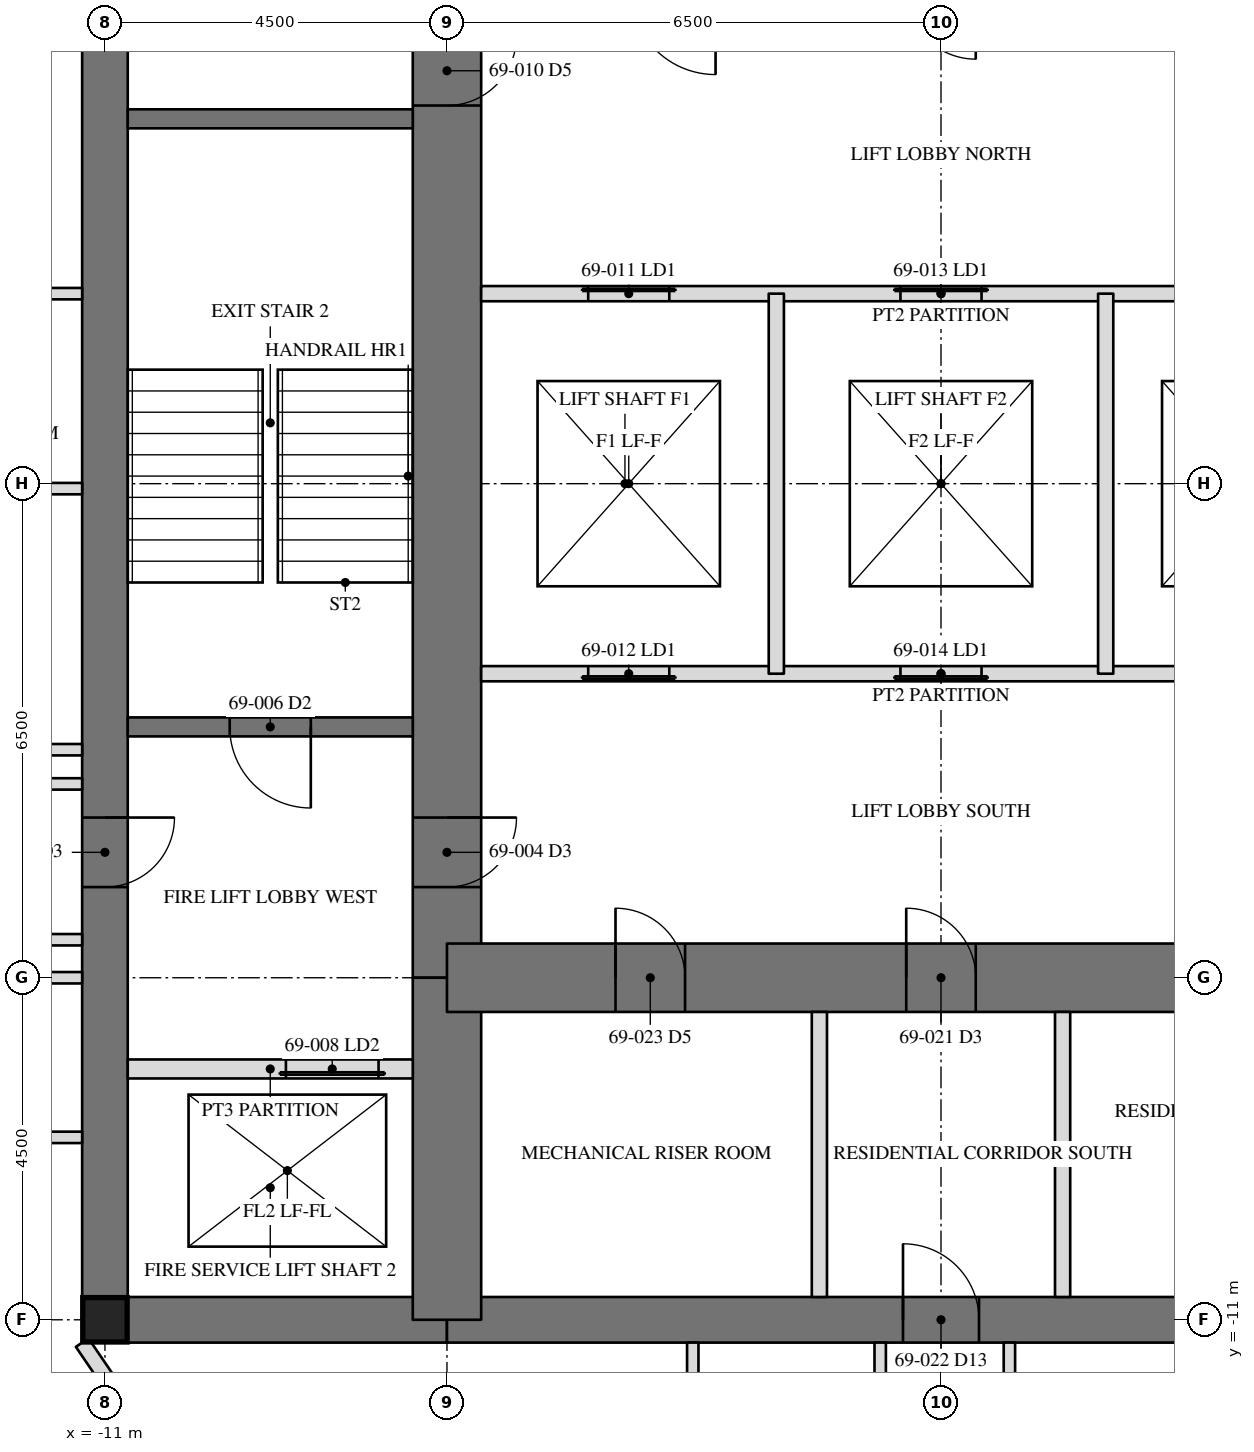
"""IFC4 building model, lengths in metres.
Left out: names, types, materials, properties, quantities, classifications, styles, units other than length and angle.
Written with IfcOpenShell. Run it as: python <this file> out.ifc"""

import sys

from ifc_helpers import new_model, si_unit, direction, frame, frame_2d, origin, origin_2d, place, context, subcontext, project, spatial, rectangle, hollow_rectangle, extrude, element, fill, save


model = new_model("IFC4")
c1 = context("Model", 3, precision=1e-05, world=origin(), true_north=direction((0.0, 1.0)))
c2 = subcontext(c1, "Body", "Model", "MODEL_VIEW")
j1 = project(units=[si_unit("LENGTHUNIT", "METRE"), si_unit("PLANEANGLEUNIT", "RADIAN")], contexts=[c1])
p1 = place(None, origin())
s1 = spatial("IfcSite", under=j1, at=p1, CompositionType="ELEMENT")
p2 = place(p1, origin())
s2 = spatial("IfcBuilding", under=s1, at=p2, CompositionType="ELEMENT")
p3 = place(p2, frame((0.0, 0.0, 281.2)))
s3 = spatial("IfcBuildingStorey", under=s2, at=p3, CompositionType="ELEMENT", Elevation=281.2)
p4 = place(p3, frame((-11.0, 11.0, 0.0), z_axis=(0.0, 0.0, 1.0), x_axis=(0.0, -1.0, 0.0)))
e1 = element("IfcWall", 1, at=p4, inside=s3, PredefinedType="SHEAR", context=c2, shape_type="SweptSolid", body=[
    extrude(rectangle(XDim=22.0, YDim=0.6, at=frame_2d((11.0, 0.0))), origin(), (0.0, 0.0, 1.0), 3.6),
])
p5 = place(p4, frame((15.393, 0.0, 0.0)))
e2 = element("IfcOpeningElement", 2, at=p5, cuts=e1, PredefinedType="OPENING", context=c2, shape_type="SweptSolid", body=[
    extrude(rectangle(XDim=0.915, YDim=2.134, at=frame_2d((0.458, 1.067))), frame((0.0, 0.31, 0.0), z_axis=(0.0, -1.0, 0.0), x_axis=(1.0, 0.0, 0.0)), (0.0, 0.0, 1.0), 0.62),
])
p6 = place(p3, frame((-11.0, -11.0, 0.0), z_axis=(0.0, 0.0, 1.0), x_axis=(1.0, 0.0, 0.0)))
e3 = element("IfcWall", 3, at=p6, inside=s3, PredefinedType="SHEAR", context=c2, shape_type="SweptSolid", body=[
    extrude(rectangle(XDim=4.5, YDim=0.6, at=frame_2d((2.25, 0.0))), origin(), (0.0, 0.0, 1.0), 3.6),
])
p7 = place(p3, frame((-6.5, -11.0, 0.0), z_axis=(0.0, 0.0, 1.0), x_axis=(1.0, 0.0, 0.0)))
e4 = element("IfcWall", 4, at=p7, inside=s3, PredefinedType="SHEAR", context=c2, shape_type="SweptSolid", body=[
    extrude(rectangle(XDim=13.0, YDim=0.6, at=frame_2d((6.5, 0.0))), origin(), (0.0, 0.0, 1.0), 3.6),
])
p8 = place(p7, frame((6.0, 0.0, 0.0)))
e5 = element("IfcOpeningElement", 5, at=p8, cuts=e4, PredefinedType="OPENING", context=c2, shape_type="SweptSolid", body=[
    extrude(rectangle(XDim=1.0, YDim=2.134, at=frame_2d((0.5, 1.067))), frame((0.0, 0.31, 0.0), z_axis=(0.0, -1.0, 0.0), x_axis=(1.0, 0.0, 0.0)), (0.0, 0.0, 1.0), 0.62),
])
p9 = place(p3, frame((-6.5, 6.5, 0.0), z_axis=(0.0, 0.0, 1.0), x_axis=(0.0, -1.0, 0.0)))
e6 = element("IfcWall", 6, at=p9, inside=s3, PredefinedType="SHEAR", context=c2, shape_type="SweptSolid", body=[
    extrude(rectangle(XDim=13.0, YDim=0.9, at=frame_2d((6.5, 0.0))), origin(), (0.0, 0.0, 1.0), 3.6),
])
p10 = place(p9, frame((10.893, 0.0, 0.0)))
e7 = element("IfcOpeningElement", 7, at=p10, cuts=e6, PredefinedType="OPENING", context=c2, shape_type="SweptSolid", body=[
    extrude(rectangle(XDim=0.915, YDim=2.134, at=frame_2d((0.458, 1.067))), frame((0.0, 0.46, 0.0), z_axis=(0.0, -1.0, 0.0), x_axis=(1.0, 0.0, 0.0)), (0.0, 0.0, 1.0), 0.92),
])
p11 = place(p9, frame((0.61, 0.0, 0.0)))
e8 = element("IfcOpeningElement", 8, at=p11, cuts=e6, PredefinedType="OPENING", context=c2, shape_type="SweptSolid", body=[
    extrude(rectangle(XDim=0.915, YDim=2.134, at=frame_2d((0.458, 1.067))), frame((0.0, 0.46, 0.0), z_axis=(0.0, -1.0, 0.0), x_axis=(1.0, 0.0, 0.0)), (0.0, 0.0, 1.0), 0.92),
])
p12 = place(p3, frame((-6.5, -6.5, 0.0), z_axis=(0.0, 0.0, 1.0), x_axis=(0.0, -1.0, 0.0)))
e9 = element("IfcWall", 9, at=p12, inside=s3, PredefinedType="SHEAR", context=c2, shape_type="SweptSolid", body=[
    extrude(rectangle(XDim=4.5, YDim=0.9, at=frame_2d((2.25, 0.0))), origin(), (0.0, 0.0, 1.0), 3.6),
])
p13 = place(p3, frame((-6.5, -6.5, 0.0), z_axis=(0.0, 0.0, 1.0), x_axis=(1.0, 0.0, 0.0)))
e10 = element("IfcWall", 10, at=p13, inside=s3, PredefinedType="SHEAR", context=c2, shape_type="SweptSolid", body=[
    extrude(rectangle(XDim=13.0, YDim=0.9, at=frame_2d((6.5, 0.0))), origin(), (0.0, 0.0, 1.0), 3.6),
])
p14 = place(p13, frame((6.042, 0.0, 0.0)))
e11 = element("IfcOpeningElement", 11, at=p14, cuts=e10, PredefinedType="OPENING", context=c2, shape_type="SweptSolid", body=[
    extrude(rectangle(XDim=0.915, YDim=2.134, at=frame_2d((0.458, 1.067))), frame((0.0, 0.46, 0.0), z_axis=(0.0, -1.0, 0.0), x_axis=(1.0, 0.0, 0.0)), (0.0, 0.0, 1.0), 0.92),
])
p15 = place(p13, frame((2.218, 0.0, 0.0)))
e12 = element("IfcOpeningElement", 12, at=p15, cuts=e10, PredefinedType="OPENING", context=c2, shape_type="SweptSolid", body=[
    extrude(rectangle(XDim=0.915, YDim=2.134, at=frame_2d((0.458, 1.067))), frame((0.0, 0.46, 0.0), z_axis=(0.0, -1.0, 0.0), x_axis=(1.0, 0.0, 0.0)), (0.0, 0.0, 1.0), 0.92),
])
p16 = place(p13, frame((9.867, 0.0, 0.0)))
e13 = element("IfcOpeningElement", 13, at=p16, cuts=e10, PredefinedType="OPENING", context=c2, shape_type="SweptSolid", body=[
    extrude(rectangle(XDim=0.915, YDim=2.134, at=frame_2d((0.458, 1.067))), frame((0.0, 0.46, 0.0), z_axis=(0.0, -1.0, 0.0), x_axis=(1.0, 0.0, 0.0)), (0.0, 0.0, 1.0), 0.92),
])
p17 = place(p3, frame((-11.0, -11.0, 0.0), z_axis=(0.0, 0.0, 1.0), x_axis=(1.0, 0.0, 0.0)))
e14 = element("IfcColumn", 14, at=p17, inside=s3, PredefinedType="COLUMN", context=c2, shape_type="SweptSolid", body=[
    extrude(hollow_rectangle(XDim=0.584, YDim=0.584, WallThickness=0.051, at=origin_2d()), origin(), (0.0, 0.0, 1.0), 3.6),
])
p18 = place(p3, frame((-6.95, 4.8, 0.0), z_axis=(0.0, 0.0, 1.0), x_axis=(-1.0, 0.0, 0.0)))
e15 = element("IfcWall", 15, at=p18, inside=s3, PredefinedType="SOLIDWALL", context=c2, shape_type="SweptSolid", body=[
    extrude(rectangle(XDim=3.75, YDim=0.25, at=frame_2d((1.875, 0.0))), origin(), (0.0, 0.0, 1.0), 3.41),
])
p19 = place(p3, frame((-6.95, -3.2, 0.0), z_axis=(0.0, 0.0, 1.0), x_axis=(-1.0, 0.0, 0.0)))
e16 = element("IfcWall", 16, at=p19, inside=s3, PredefinedType="SOLIDWALL", context=c2, shape_type="SweptSolid", body=[
    extrude(rectangle(XDim=3.75, YDim=0.25, at=frame_2d((1.875, 0.0))), origin(), (0.0, 0.0, 1.0), 3.41),
])
p20 = place(p19, frame((1.342, 0.0, 0.0)))
e17 = element("IfcOpeningElement", 17, at=p20, cuts=e16, PredefinedType="OPENING", context=c2, shape_type="SweptSolid", body=[
    extrude(rectangle(XDim=1.067, YDim=2.134, at=frame_2d((0.533, 1.067))), frame((0.0, 0.135, 0.0), z_axis=(0.0, -1.0, 0.0), x_axis=(1.0, 0.0, 0.0)), (0.0, 0.0, 1.0), 0.27),
])
p21 = place(p3, frame((-6.95, -7.7, 0.0), z_axis=(0.0, 0.0, 1.0), x_axis=(-1.0, 0.0, 0.0)))
e18 = element("IfcWall", 18, at=p21, inside=s3, PredefinedType="PARTITIONING", context=c2, shape_type="SweptSolid", body=[
    extrude(rectangle(XDim=3.75, YDim=0.25, at=frame_2d((1.875, 0.0))), origin(), (0.0, 0.0, 1.0), 3.41),
])
p22 = place(p21, frame((0.45, 0.0, 0.0)))
e19 = element("IfcOpeningElement", 19, at=p22, cuts=e18, PredefinedType="OPENING", context=c2, shape_type="SweptSolid", body=[
    extrude(rectangle(XDim=1.219, YDim=2.134, at=frame_2d((0.609, 1.067))), frame((0.0, 0.135, 0.0), z_axis=(0.0, -1.0, 0.0), x_axis=(1.0, 0.0, 0.0)), (0.0, 0.0, 1.0), 0.27),
])
p23 = place(p3, frame((-6.05, 2.5, 0.0), z_axis=(0.0, 0.0, 1.0), x_axis=(1.0, 0.0, 0.0)))
e20 = element("IfcWall", 20, at=p23, inside=s3, PredefinedType="PARTITIONING", context=c2, shape_type="SweptSolid", body=[
    extrude(rectangle(XDim=12.1, YDim=0.2, at=frame_2d((6.05, 0.0))), origin(), (0.0, 0.0, 1.0), 3.41),
])
p24 = place(p23, frame((1.408, 0.0, 0.0)))
e21 = element("IfcOpeningElement", 21, at=p24, cuts=e20, PredefinedType="OPENING", context=c2, shape_type="SweptSolid", body=[
    extrude(rectangle(XDim=1.067, YDim=2.134, at=frame_2d((0.533, 1.067))), frame((0.0, 0.11, 0.0), z_axis=(0.0, -1.0, 0.0), x_axis=(1.0, 0.0, 0.0)), (0.0, 0.0, 1.0), 0.22),
])
p25 = place(p23, frame((5.517, 0.0, 0.0)))
e22 = element("IfcOpeningElement", 22, at=p25, cuts=e20, PredefinedType="OPENING", context=c2, shape_type="SweptSolid", body=[
    extrude(rectangle(XDim=1.067, YDim=2.134, at=frame_2d((0.533, 1.067))), frame((0.0, 0.11, 0.0), z_axis=(0.0, -1.0, 0.0), x_axis=(1.0, 0.0, 0.0)), (0.0, 0.0, 1.0), 0.22),
])
p26 = place(p23, frame((9.625, 0.0, 0.0)))
e23 = element("IfcOpeningElement", 23, at=p26, cuts=e20, PredefinedType="OPENING", context=c2, shape_type="SweptSolid", body=[
    extrude(rectangle(XDim=1.067, YDim=2.134, at=frame_2d((0.533, 1.067))), frame((0.0, 0.11, 0.0), z_axis=(0.0, -1.0, 0.0), x_axis=(1.0, 0.0, 0.0)), (0.0, 0.0, 1.0), 0.22),
])
p27 = place(p3, frame((6.05, -2.5, 0.0), z_axis=(0.0, 0.0, 1.0), x_axis=(-1.0, 0.0, 0.0)))
e24 = element("IfcWall", 24, at=p27, inside=s3, PredefinedType="PARTITIONING", context=c2, shape_type="SweptSolid", body=[
    extrude(rectangle(XDim=12.1, YDim=0.2, at=frame_2d((6.05, 0.0))), origin(), (0.0, 0.0, 1.0), 3.41),
])
p28 = place(p27, frame((9.625, 0.0, 0.0)))
e25 = element("IfcOpeningElement", 25, at=p28, cuts=e24, PredefinedType="OPENING", context=c2, shape_type="SweptSolid", body=[
    extrude(rectangle(XDim=1.067, YDim=2.134, at=frame_2d((0.533, 1.067))), frame((0.0, 0.11, 0.0), z_axis=(0.0, -1.0, 0.0), x_axis=(1.0, 0.0, 0.0)), (0.0, 0.0, 1.0), 0.22),
])
p29 = place(p27, frame((5.517, 0.0, 0.0)))
e26 = element("IfcOpeningElement", 26, at=p29, cuts=e24, PredefinedType="OPENING", context=c2, shape_type="SweptSolid", body=[
    extrude(rectangle(XDim=1.067, YDim=2.134, at=frame_2d((0.533, 1.067))), frame((0.0, 0.11, 0.0), z_axis=(0.0, -1.0, 0.0), x_axis=(1.0, 0.0, 0.0)), (0.0, 0.0, 1.0), 0.22),
])
p30 = place(p27, frame((1.408, 0.0, 0.0)))
e27 = element("IfcOpeningElement", 27, at=p30, cuts=e24, PredefinedType="OPENING", context=c2, shape_type="SweptSolid", body=[
    extrude(rectangle(XDim=1.067, YDim=2.134, at=frame_2d((0.533, 1.067))), frame((0.0, 0.11, 0.0), z_axis=(0.0, -1.0, 0.0), x_axis=(1.0, 0.0, 0.0)), (0.0, 0.0, 1.0), 0.22),
])
for number, where, z_axis, x_axis in (
    (28, (-2.167, -2.5, 0.0), (0.0, 0.0, 1.0), (0.0, 1.0, 0.0)),
    (29, (2.167, -2.5, 0.0), (0.0, 0.0, 1.0), (0.0, 1.0, 0.0)),
):
    element("IfcWall", number, at=place(p3, frame(where, z_axis=z_axis, x_axis=x_axis)), inside=s3, PredefinedType="PARTITIONING", context=c2, shape_type="SweptSolid", body=[
        extrude(rectangle(XDim=5.0, YDim=0.2, at=frame_2d((2.5, 0.0))), origin(), (0.0, 0.0, 1.0), 3.41),
    ])
for number, where, z_axis, x_axis in (
    (30, (-1.6, -6.95, 0.0), (0.0, 0.0, 1.0), (0.0, -1.0, 0.0)),
    (31, (1.6, -6.95, 0.0), (0.0, 0.0, 1.0), (0.0, -1.0, 0.0)),
):
    element("IfcWall", number, at=place(p3, frame(where, z_axis=z_axis, x_axis=x_axis)), inside=s3, PredefinedType="PARTITIONING", context=c2, shape_type="SweptSolid", body=[
        extrude(rectangle(XDim=3.75, YDim=0.2, at=frame_2d((1.875, 0.0))), origin(), (0.0, 0.0, 1.0), 3.41),
    ])
p31 = place(p3, frame((-11.3, -11.3, 0.0), z_axis=(0.0, 0.0, 1.0), x_axis=(0.563469639691, -0.826136771453, 0.0)))
e32 = element("IfcWall", 32, at=p31, inside=s3, PredefinedType="PARTITIONING", context=c2, shape_type="SweptSolid", body=[
    extrude(rectangle(XDim=3.137, YDim=0.2, at=frame_2d((1.568, 0.0))), origin(), (0.0, 0.0, 1.0), 2.704),
])
p32 = place(p3, frame((-11.3, -0.065, 0.0), z_axis=(0.0, 0.0, 1.0), x_axis=(-1.0, 0.0, 0.0)))
e33 = element("IfcWall", 33, at=p32, inside=s3, PredefinedType="PARTITIONING", context=c2, shape_type="SweptSolid", body=[
    extrude(rectangle(XDim=5.615, YDim=0.15, at=frame_2d((2.808, 0.0))), origin(), (0.0, 0.0, 1.0), 2.709),
])
p33 = place(p32, frame((3.042, 0.0, 0.0)))
e34 = element("IfcOpeningElement", 34, at=p33, cuts=e33, PredefinedType="OPENING", context=c2, shape_type="SweptSolid", body=[
    extrude(rectangle(XDim=0.915, YDim=2.134, at=frame_2d((0.458, 1.067))), frame((0.0, 0.085, 0.0), z_axis=(0.0, -1.0, 0.0), x_axis=(1.0, 0.0, 0.0)), (0.0, 0.0, 1.0), 0.17),
])
p34 = place(p32, frame((4.058, 0.0, 0.0)))
e35 = element("IfcOpeningElement", 35, at=p34, cuts=e33, PredefinedType="OPENING", context=c2, shape_type="SweptSolid", body=[
    extrude(rectangle(XDim=0.915, YDim=2.134, at=frame_2d((0.458, 1.067))), frame((0.0, 0.085, 0.0), z_axis=(0.0, -1.0, 0.0), x_axis=(1.0, 0.0, 0.0)), (0.0, 0.0, 1.0), 0.17),
])
p35 = place(p3, frame((-11.3, -6.5, 0.0), z_axis=(0.0, 0.0, 1.0), x_axis=(-1.0, 0.0, 0.0)))
e36 = element("IfcWall", 36, at=p35, inside=s3, PredefinedType="PARTITIONING", context=c2, shape_type="SweptSolid", body=[
    extrude(rectangle(XDim=5.615, YDim=0.15, at=frame_2d((2.808, 0.0))), origin(), (0.0, 0.0, 1.0), 2.966),
])
p36 = place(p35, frame((2.742, 0.0, 0.0)))
e37 = element("IfcOpeningElement", 37, at=p36, cuts=e36, PredefinedType="OPENING", context=c2, shape_type="SweptSolid", body=[
    extrude(rectangle(XDim=0.915, YDim=2.134, at=frame_2d((0.458, 1.067))), frame((0.0, 0.085, 0.0), z_axis=(0.0, -1.0, 0.0), x_axis=(1.0, 0.0, 0.0)), (0.0, 0.0, 1.0), 0.17),
])
for number, where, z_axis, x_axis in (
    (38, (-11.3, -3.95, 0.0), (0.0, 0.0, 1.0), (-1.0, 0.0, 0.0)),
    (39, (-11.3, -6.0, 0.0), (0.0, 0.0, 1.0), (-1.0, 0.0, 0.0)),
):
    element("IfcWall", number, at=place(p3, frame(where, z_axis=z_axis, x_axis=x_axis)), inside=s3, PredefinedType="PARTITIONING", context=c2, shape_type="SweptSolid", body=[
        extrude(rectangle(XDim=1.525, YDim=0.15, at=frame_2d((0.762, 0.0))), origin(), (0.0, 0.0, 1.0), 3.41),
    ])
p37 = place(p3, frame((-11.3, -3.5, 0.0), z_axis=(0.0, 0.0, 1.0), x_axis=(-1.0, 0.0, 0.0)))
e40 = element("IfcWall", 40, at=p37, inside=s3, PredefinedType="PARTITIONING", context=c2, shape_type="SweptSolid", body=[
    extrude(rectangle(XDim=2.725, YDim=0.15, at=frame_2d((1.362, 0.0))), origin(), (0.0, 0.0, 1.0), 3.41),
])
p38 = place(p3, frame((-11.3, -8.6, 0.0), z_axis=(0.0, 0.0, 1.0), x_axis=(-1.0, 0.0, 0.0)))
e41 = element("IfcWall", 41, at=p38, inside=s3, PredefinedType="PARTITIONING", context=c2, shape_type="SweptSolid", body=[
    extrude(rectangle(XDim=1.925, YDim=0.15, at=frame_2d((0.962, 0.0))), origin(), (0.0, 0.0, 1.0), 3.41),
])
p39 = place(p3, frame((-11.3, 2.5, 0.0), z_axis=(0.0, 0.0, 1.0), x_axis=(-1.0, 0.0, 0.0)))
e42 = element("IfcWall", 42, at=p39, inside=s3, PredefinedType="PARTITIONING", context=c2, shape_type="SweptSolid", body=[
    extrude(rectangle(XDim=2.375, YDim=0.15, at=frame_2d((1.188, 0.0))), origin(), (0.0, 0.0, 1.0), 3.41),
])
p40 = place(p3, frame((-3.266, -11.3, 0.0), z_axis=(0.0, 0.0, 1.0), x_axis=(0.0, -1.0, 0.0)))
e43 = element("IfcWall", 43, at=p40, inside=s3, PredefinedType="PARTITIONING", context=c2, shape_type="SweptSolid", body=[
    extrude(rectangle(XDim=5.615, YDim=0.15, at=frame_2d((2.808, 0.0))), origin(), (0.0, 0.0, 1.0), 2.709),
])
p41 = place(p40, frame((3.242, 0.0, 0.0)))
e44 = element("IfcOpeningElement", 44, at=p41, cuts=e43, PredefinedType="OPENING", context=c2, shape_type="SweptSolid", body=[
    extrude(rectangle(XDim=0.915, YDim=2.134, at=frame_2d((0.458, 1.067))), frame((0.0, 0.085, 0.0), z_axis=(0.0, -1.0, 0.0), x_axis=(1.0, 0.0, 0.0)), (0.0, 0.0, 1.0), 0.17),
])
p42 = place(p3, frame((0.9, -11.3, 0.0), z_axis=(0.0, 0.0, 1.0), x_axis=(0.0, -1.0, 0.0)))
e45 = element("IfcWall", 45, at=p42, inside=s3, PredefinedType="PARTITIONING", context=c2, shape_type="SweptSolid", body=[
    extrude(rectangle(XDim=2.725, YDim=0.15, at=frame_2d((1.362, 0.0))), origin(), (0.0, 0.0, 1.0), 3.41),
])
p43 = place(p3, frame((-0.8, -11.3, 0.0), z_axis=(0.0, 0.0, 1.0), x_axis=(0.0, -1.0, 0.0)))
e46 = element("IfcWall", 46, at=p43, inside=s3, PredefinedType="PARTITIONING", context=c2, shape_type="SweptSolid", body=[
    extrude(rectangle(XDim=2.375, YDim=0.15, at=frame_2d((1.188, 0.0))), origin(), (0.0, 0.0, 1.0), 3.41),
])
p44 = place(p5, origin())
e47 = element("IfcDoor", 47, at=p44, inside=s3, OperationType="SINGLE_SWING_RIGHT", PredefinedType="DOOR", context=c2, shape_type="SweptSolid", body=[
    extrude(rectangle(XDim=0.915, YDim=2.134, at=frame_2d((0.458, 1.067))), frame((0.0, -0.225, 0.0), z_axis=(0.0, -1.0, 0.0), x_axis=(1.0, 0.0, 0.0)), (0.0, 0.0, 1.0), 0.05),
])
fill(e2, e47)
p45 = place(p10, origin())
e48 = element("IfcDoor", 48, at=p45, inside=s3, OperationType="SINGLE_SWING_RIGHT", PredefinedType="DOOR", context=c2, shape_type="SweptSolid", body=[
    extrude(rectangle(XDim=0.915, YDim=2.134, at=frame_2d((0.458, 1.067))), frame((0.0, -0.375, 0.0), z_axis=(0.0, -1.0, 0.0), x_axis=(1.0, 0.0, 0.0)), (0.0, 0.0, 1.0), 0.05),
])
fill(e7, e48)
p46 = place(p20, origin())
e49 = element("IfcDoor", 49, at=p46, inside=s3, OperationType="SINGLE_SWING_LEFT", PredefinedType="DOOR", context=c2, shape_type="SweptSolid", body=[
    extrude(rectangle(XDim=1.067, YDim=2.134, at=frame_2d((0.533, 1.067))), frame((0.0, 0.025, 0.0), z_axis=(0.0, -1.0, 0.0), x_axis=(1.0, 0.0, 0.0)), (0.0, 0.0, 1.0), 0.05),
])
fill(e17, e49)
p47 = place(p22, origin())
e50 = element("IfcDoor", 50, at=p47, inside=s3, OperationType="SLIDING_TO_LEFT", PredefinedType="DOOR", context=c2, shape_type="SweptSolid", body=[
    extrude(rectangle(XDim=1.219, YDim=2.134, at=frame_2d((0.609, 1.067))), frame((0.0, 0.025, 0.0), z_axis=(0.0, -1.0, 0.0), x_axis=(1.0, 0.0, 0.0)), (0.0, 0.0, 1.0), 0.05),
])
fill(e19, e50)
p48 = place(p11, origin())
e51 = element("IfcDoor", 51, at=p48, inside=s3, OperationType="SINGLE_SWING_RIGHT", PredefinedType="DOOR", context=c2, shape_type="SweptSolid", body=[
    extrude(rectangle(XDim=0.915, YDim=2.134, at=frame_2d((0.458, 1.067))), frame((0.0, -0.375, 0.0), z_axis=(0.0, -1.0, 0.0), x_axis=(1.0, 0.0, 0.0)), (0.0, 0.0, 1.0), 0.05),
])
fill(e8, e51)
p49 = place(p24, origin())
e52 = element("IfcDoor", 52, at=p49, inside=s3, OperationType="SLIDING_TO_LEFT", PredefinedType="DOOR", context=c2, shape_type="SweptSolid", body=[
    extrude(rectangle(XDim=1.067, YDim=2.134, at=frame_2d((0.533, 1.067))), frame((0.0, 0.025, 0.0), z_axis=(0.0, -1.0, 0.0), x_axis=(1.0, 0.0, 0.0)), (0.0, 0.0, 1.0), 0.05),
])
fill(e21, e52)
p50 = place(p28, origin())
e53 = element("IfcDoor", 53, at=p50, inside=s3, OperationType="SLIDING_TO_LEFT", PredefinedType="DOOR", context=c2, shape_type="SweptSolid", body=[
    extrude(rectangle(XDim=1.067, YDim=2.134, at=frame_2d((0.533, 1.067))), frame((0.0, 0.025, 0.0), z_axis=(0.0, -1.0, 0.0), x_axis=(1.0, 0.0, 0.0)), (0.0, 0.0, 1.0), 0.05),
])
fill(e25, e53)
p51 = place(p25, origin())
e54 = element("IfcDoor", 54, at=p51, inside=s3, OperationType="SLIDING_TO_LEFT", PredefinedType="DOOR", context=c2, shape_type="SweptSolid", body=[
    extrude(rectangle(XDim=1.067, YDim=2.134, at=frame_2d((0.533, 1.067))), frame((0.0, 0.025, 0.0), z_axis=(0.0, -1.0, 0.0), x_axis=(1.0, 0.0, 0.0)), (0.0, 0.0, 1.0), 0.05),
])
fill(e22, e54)
p52 = place(p29, origin())
e55 = element("IfcDoor", 55, at=p52, inside=s3, OperationType="SLIDING_TO_LEFT", PredefinedType="DOOR", context=c2, shape_type="SweptSolid", body=[
    extrude(rectangle(XDim=1.067, YDim=2.134, at=frame_2d((0.533, 1.067))), frame((0.0, 0.025, 0.0), z_axis=(0.0, -1.0, 0.0), x_axis=(1.0, 0.0, 0.0)), (0.0, 0.0, 1.0), 0.05),
])
fill(e26, e55)
p53 = place(p14, origin())
e56 = element("IfcDoor", 56, at=p53, inside=s3, OperationType="SINGLE_SWING_RIGHT", PredefinedType="DOOR", context=c2, shape_type="SweptSolid", body=[
    extrude(rectangle(XDim=0.915, YDim=2.134, at=frame_2d((0.458, 1.067))), frame((0.0, -0.375, 0.0), z_axis=(0.0, -1.0, 0.0), x_axis=(1.0, 0.0, 0.0)), (0.0, 0.0, 1.0), 0.05),
])
fill(e11, e56)
p54 = place(p8, origin())
e57 = element("IfcDoor", 57, at=p54, inside=s3, OperationType="SINGLE_SWING_RIGHT", PredefinedType="DOOR", context=c2, shape_type="SweptSolid", body=[
    extrude(rectangle(XDim=1.0, YDim=2.134, at=frame_2d((0.5, 1.067))), frame((0.0, -0.225, 0.0), z_axis=(0.0, -1.0, 0.0), x_axis=(1.0, 0.0, 0.0)), (0.0, 0.0, 1.0), 0.05),
])
fill(e5, e57)
p55 = place(p15, origin())
e58 = element("IfcDoor", 58, at=p55, inside=s3, OperationType="SINGLE_SWING_RIGHT", PredefinedType="DOOR", context=c2, shape_type="SweptSolid", body=[
    extrude(rectangle(XDim=0.915, YDim=2.134, at=frame_2d((0.458, 1.067))), frame((0.0, -0.375, 0.0), z_axis=(0.0, -1.0, 0.0), x_axis=(1.0, 0.0, 0.0)), (0.0, 0.0, 1.0), 0.05),
])
fill(e12, e58)
save(model, sys.argv[1])
